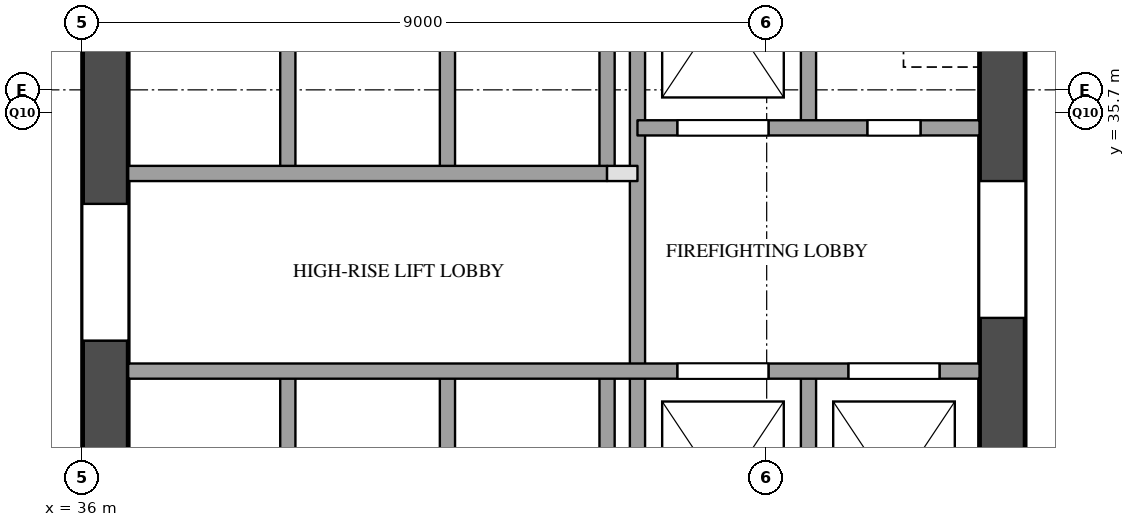
"""IFC4 building model, lengths in metres.
Left out: names, types, materials, properties, quantities, classifications, styles, units other than length and angle.
Written with IfcOpenShell. Run it as: python <this file> out.ifc"""

import sys

from ifc_helpers import new_model, si_unit, direction, frame, frame_2d, origin, place, context, subcontext, project, spatial, rectangle, extrude, element, fill, save


model = new_model("IFC4")
c1 = context("Model", 3, precision=1e-05, world=origin(), true_north=direction((0.0, 1.0)))
c2 = subcontext(c1, "Body", "Model", "MODEL_VIEW")
j1 = project(units=[si_unit("LENGTHUNIT", "METRE"), si_unit("PLANEANGLEUNIT", "RADIAN")], contexts=[c1])
p1 = place(None, origin())
s1 = spatial("IfcSite", under=j1, at=p1, CompositionType="ELEMENT")
p2 = place(p1, origin())
s2 = spatial("IfcBuilding", under=s1, at=p2, CompositionType="ELEMENT")
p3 = place(p2, frame((0.0, 0.0, 104.4)))
s3 = spatial("IfcBuildingStorey", under=s2, at=p3, CompositionType="ELEMENT", Elevation=104.4)
p4 = place(p3, frame((36.3, 29.1, 0.0), z_axis=(0.0, 0.0, 1.0), x_axis=(0.0, 1.0, 0.0)))
e1 = element("IfcWall", 1, at=p4, inside=s3, PredefinedType="SHEAR", context=c2, shape_type="SweptSolid", body=[
    extrude(rectangle(XDim=20.3, YDim=0.6, at=frame_2d((10.15, 0.0))), origin(), (0.0, 0.0, 1.0), 3.5),
])
p5 = place(p4, frame((3.6, 0.0, 0.0)))
e2 = element("IfcOpeningElement", 2, at=p5, cuts=e1, PredefinedType="OPENING", context=c2, shape_type="SweptSolid", body=[
    extrude(rectangle(XDim=1.8, YDim=2.1, at=frame_2d((0.9, 1.05))), frame((0.0, 0.31, 0.0), z_axis=(0.0, -1.0, 0.0), x_axis=(1.0, 0.0, 0.0)), (0.0, 0.0, 1.0), 0.62),
])
p6 = place(p4, frame((16.4, 0.0, 0.0)))
e3 = element("IfcOpeningElement", 3, at=p6, cuts=e1, PredefinedType="OPENING", context=c2, shape_type="SweptSolid", body=[
    extrude(rectangle(XDim=1.0, YDim=2.1, at=frame_2d((0.5, 1.05))), frame((0.0, 0.31, 0.0), z_axis=(0.0, -1.0, 0.0), x_axis=(1.0, 0.0, 0.0)), (0.0, 0.0, 1.0), 0.62),
])
p7 = place(p3, frame((48.1, 29.1, 0.0), z_axis=(0.0, 0.0, 1.0), x_axis=(0.0, 1.0, 0.0)))
e4 = element("IfcWall", 4, at=p7, inside=s3, PredefinedType="SHEAR", context=c2, shape_type="SweptSolid", body=[
    extrude(rectangle(XDim=20.3, YDim=0.6, at=frame_2d((10.15, 0.0))), origin(), (0.0, 0.0, 1.0), 3.5),
])
p8 = place(p7, frame((12.5, 0.0, 0.0)))
e5 = element("IfcOpeningElement", 5, at=p8, cuts=e4, PredefinedType="OPENING", context=c2, shape_type="SweptSolid", body=[
    extrude(rectangle(XDim=0.7, YDim=2.1, at=frame_2d((0.35, 1.05))), frame((0.0, 0.31, 0.0), z_axis=(0.0, -1.0, 0.0), x_axis=(1.0, 0.0, 0.0)), (0.0, 0.0, 1.0), 0.62),
])
p9 = place(p7, frame((3.9, 0.0, 0.0)))
e6 = element("IfcOpeningElement", 6, at=p9, cuts=e4, PredefinedType="OPENING", context=c2, shape_type="SweptSolid", body=[
    extrude(rectangle(XDim=1.8, YDim=2.1, at=frame_2d((0.9, 1.05))), frame((0.0, 0.31, 0.0), z_axis=(0.0, -1.0, 0.0), x_axis=(1.0, 0.0, 0.0)), (0.0, 0.0, 1.0), 0.62),
])
p10 = place(p3, frame((38.7, 29.1, 0.0), z_axis=(0.0, 0.0, 1.0), x_axis=(0.0, 1.0, 0.0)))
e7 = element("IfcWall", 7, at=p10, inside=s3, PredefinedType="SOLIDWALL", context=c2, shape_type="SweptSolid", body=[
    extrude(rectangle(XDim=3.2, YDim=0.2, at=frame_2d((1.6, 0.0))), origin(), (0.0, 0.0, 1.0), 3.5),
])
p11 = place(p3, frame((38.7, 34.9, 0.0), z_axis=(0.0, 0.0, 1.0), x_axis=(0.0, 1.0, 0.0)))
e8 = element("IfcWall", 8, at=p11, inside=s3, PredefinedType="SOLIDWALL", context=c2, shape_type="SweptSolid", body=[
    extrude(rectangle(XDim=3.2, YDim=0.2, at=frame_2d((1.6, 0.0))), origin(), (0.0, 0.0, 1.0), 3.5),
])
p12 = place(p3, frame((40.8, 29.1, 0.0), z_axis=(0.0, 0.0, 1.0), x_axis=(0.0, 1.0, 0.0)))
e9 = element("IfcWall", 9, at=p12, inside=s3, PredefinedType="SOLIDWALL", context=c2, shape_type="SweptSolid", body=[
    extrude(rectangle(XDim=3.2, YDim=0.2, at=frame_2d((1.6, 0.0))), origin(), (0.0, 0.0, 1.0), 3.5),
])
p13 = place(p3, frame((40.8, 34.9, 0.0), z_axis=(0.0, 0.0, 1.0), x_axis=(0.0, 1.0, 0.0)))
e10 = element("IfcWall", 10, at=p13, inside=s3, PredefinedType="SOLIDWALL", context=c2, shape_type="SweptSolid", body=[
    extrude(rectangle(XDim=3.2, YDim=0.2, at=frame_2d((1.6, 0.0))), origin(), (0.0, 0.0, 1.0), 3.5),
])
p14 = place(p3, frame((42.9, 29.1, 0.0), z_axis=(0.0, 0.0, 1.0), x_axis=(0.0, 1.0, 0.0)))
e11 = element("IfcWall", 11, at=p14, inside=s3, PredefinedType="SOLIDWALL", context=c2, shape_type="SweptSolid", body=[
    extrude(rectangle(XDim=3.2, YDim=0.2, at=frame_2d((1.6, 0.0))), origin(), (0.0, 0.0, 1.0), 3.5),
])
p15 = place(p3, frame((42.9, 34.9, 0.0), z_axis=(0.0, 0.0, 1.0), x_axis=(0.0, 1.0, 0.0)))
e12 = element("IfcWall", 12, at=p15, inside=s3, PredefinedType="SOLIDWALL", context=c2, shape_type="SweptSolid", body=[
    extrude(rectangle(XDim=3.2, YDim=0.2, at=frame_2d((1.6, 0.0))), origin(), (0.0, 0.0, 1.0), 3.5),
])
p16 = place(p3, frame((43.3, 29.1, 0.0), z_axis=(0.0, 0.0, 1.0), x_axis=(0.0, 1.0, 0.0)))
e13 = element("IfcWall", 13, at=p16, inside=s3, PredefinedType="SOLIDWALL", context=c2, shape_type="SweptSolid", body=[
    extrude(rectangle(XDim=9.9, YDim=0.2, at=frame_2d((4.95, 0.0))), origin(), (0.0, 0.0, 1.0), 3.5),
])
for number, where, z_axis, x_axis in (
    (14, (45.55, 29.1, 0.0), (0.0, 0.0, 1.0), (0.0, 1.0, 0.0)),
    (15, (45.55, 35.5, 0.0), (0.0, 0.0, 1.0), (0.0, 1.0, 0.0)),
):
    element("IfcWall", number, at=place(p3, frame(where, z_axis=z_axis, x_axis=x_axis)), inside=s3, PredefinedType="SOLIDWALL", context=c2, shape_type="SweptSolid", body=[
        extrude(rectangle(XDim=3.2, YDim=0.2, at=frame_2d((1.6, 0.0))), origin(), (0.0, 0.0, 1.0), 3.5),
    ])
p17 = place(p3, frame((36.6, 32.3, 0.0), z_axis=(0.0, 0.0, 1.0), x_axis=(1.0, 0.0, 0.0)))
e16 = element("IfcWall", 16, at=p17, inside=s3, PredefinedType="SOLIDWALL", context=c2, shape_type="SweptSolid", body=[
    extrude(rectangle(XDim=11.2, YDim=0.2, at=frame_2d((5.6, 0.0))), origin(), (0.0, 0.0, 1.0), 3.5),
])
p18 = place(p17, frame((7.225, 0.0, 0.0)))
e17 = element("IfcOpeningElement", 17, at=p18, cuts=e16, PredefinedType="OPENING", context=c2, shape_type="SweptSolid", body=[
    extrude(rectangle(XDim=1.2, YDim=2.1, at=frame_2d((0.6, 1.05))), frame((0.0, 0.11, 0.0), z_axis=(0.0, -1.0, 0.0), x_axis=(1.0, 0.0, 0.0)), (0.0, 0.0, 1.0), 0.22),
])
p19 = place(p17, frame((9.475, 0.0, 0.0)))
e18 = element("IfcOpeningElement", 18, at=p19, cuts=e16, PredefinedType="OPENING", context=c2, shape_type="SweptSolid", body=[
    extrude(rectangle(XDim=1.2, YDim=2.1, at=frame_2d((0.6, 1.05))), frame((0.0, 0.11, 0.0), z_axis=(0.0, -1.0, 0.0), x_axis=(1.0, 0.0, 0.0)), (0.0, 0.0, 1.0), 0.22),
])
p20 = place(p3, frame((42.9, 34.9, 0.0), z_axis=(0.0, 0.0, 1.0), x_axis=(1.0, 0.0, 0.0)))
e19 = element("IfcWall", 19, at=p20, inside=s3, PredefinedType="PARTITIONING", context=c2, shape_type="SweptSolid", body=[
    extrude(rectangle(XDim=0.4, YDim=0.2, at=frame_2d((0.2, 0.0))), origin(), (0.0, 0.0, 1.0), 3.5),
])
p21 = place(p3, frame((36.6, 34.9, 0.0), z_axis=(0.0, 0.0, 1.0), x_axis=(1.0, 0.0, 0.0)))
e20 = element("IfcWall", 20, at=p21, inside=s3, PredefinedType="SOLIDWALL", context=c2, shape_type="SweptSolid", body=[
    extrude(rectangle(XDim=6.3, YDim=0.2, at=frame_2d((3.15, 0.0))), origin(), (0.0, 0.0, 1.0), 3.5),
])
p22 = place(p3, frame((43.3, 35.5, 0.0), z_axis=(0.0, 0.0, 1.0), x_axis=(1.0, 0.0, 0.0)))
e21 = element("IfcWall", 21, at=p22, inside=s3, PredefinedType="SOLIDWALL", context=c2, shape_type="SweptSolid", body=[
    extrude(rectangle(XDim=4.5, YDim=0.2, at=frame_2d((2.25, 0.0))), origin(), (0.0, 0.0, 1.0), 3.5),
])
p23 = place(p22, frame((0.525, 0.0, 0.0)))
e22 = element("IfcOpeningElement", 22, at=p23, cuts=e21, PredefinedType="OPENING", context=c2, shape_type="SweptSolid", body=[
    extrude(rectangle(XDim=1.2, YDim=2.1, at=frame_2d((0.6, 1.05))), frame((0.0, 0.11, 0.0), z_axis=(0.0, -1.0, 0.0), x_axis=(1.0, 0.0, 0.0)), (0.0, 0.0, 1.0), 0.22),
])
p24 = place(p22, frame((3.025, 0.0, 0.0)))
e23 = element("IfcOpeningElement", 23, at=p24, cuts=e21, PredefinedType="OPENING", context=c2, shape_type="SweptSolid", body=[
    extrude(rectangle(XDim=0.7, YDim=2.1, at=frame_2d((0.35, 1.05))), frame((0.0, 0.11, 0.0), z_axis=(0.0, -1.0, 0.0), x_axis=(1.0, 0.0, 0.0)), (0.0, 0.0, 1.0), 0.22),
])
p25 = place(p18, origin())
e24 = element("IfcDoor", 24, at=p25, inside=s3, OperationType="SLIDING_TO_LEFT", PredefinedType="DOOR", context=c2, shape_type="SweptSolid", body=[
    extrude(rectangle(XDim=1.2, YDim=2.1, at=frame_2d((0.6, 1.05))), frame((0.0, 0.025, 0.0), z_axis=(0.0, -1.0, 0.0), x_axis=(1.0, 0.0, 0.0)), (0.0, 0.0, 1.0), 0.05),
])
fill(e17, e24)
p26 = place(p19, origin())
e25 = element("IfcDoor", 25, at=p26, inside=s3, OperationType="SLIDING_TO_LEFT", PredefinedType="DOOR", context=c2, shape_type="SweptSolid", body=[
    extrude(rectangle(XDim=1.2, YDim=2.1, at=frame_2d((0.6, 1.05))), frame((0.0, 0.025, 0.0), z_axis=(0.0, -1.0, 0.0), x_axis=(1.0, 0.0, 0.0)), (0.0, 0.0, 1.0), 0.05),
])
fill(e18, e25)
p27 = place(p23, origin())
e26 = element("IfcDoor", 26, at=p27, inside=s3, OperationType="SLIDING_TO_LEFT", PredefinedType="DOOR", context=c2, shape_type="SweptSolid", body=[
    extrude(rectangle(XDim=1.2, YDim=2.1, at=frame_2d((0.6, 1.05))), frame((0.0, 0.025, 0.0), z_axis=(0.0, -1.0, 0.0), x_axis=(1.0, 0.0, 0.0)), (0.0, 0.0, 1.0), 0.05),
])
fill(e22, e26)
p28 = place(p5, origin())
e27 = element("IfcDoor", 27, at=p28, inside=s3, OperationType="DOUBLE_DOOR_SINGLE_SWING", PredefinedType="DOOR", context=c2, shape_type="SweptSolid", body=[
    extrude(rectangle(XDim=1.8, YDim=2.1, at=frame_2d((0.9, 1.05))), frame((0.0, 0.025, 0.0), z_axis=(0.0, -1.0, 0.0), x_axis=(1.0, 0.0, 0.0)), (0.0, 0.0, 1.0), 0.05),
])
fill(e2, e27)
p29 = place(p9, origin())
e28 = element("IfcDoor", 28, at=p29, inside=s3, OperationType="DOUBLE_DOOR_SINGLE_SWING", PredefinedType="DOOR", context=c2, shape_type="SweptSolid", body=[
    extrude(rectangle(XDim=1.8, YDim=2.1, at=frame_2d((0.9, 1.05))), frame((0.0, 0.025, 0.0), z_axis=(0.0, -1.0, 0.0), x_axis=(1.0, 0.0, 0.0)), (0.0, 0.0, 1.0), 0.05),
])
fill(e6, e28)
p30 = place(p24, origin())
e29 = element("IfcDoor", 29, at=p30, inside=s3, OperationType="SINGLE_SWING_RIGHT", PredefinedType="DOOR", context=c2, shape_type="SweptSolid", body=[
    extrude(rectangle(XDim=0.7, YDim=2.1, at=frame_2d((0.35, 1.05))), frame((0.0, 0.025, 0.0), z_axis=(0.0, -1.0, 0.0), x_axis=(1.0, 0.0, 0.0)), (0.0, 0.0, 1.0), 0.05),
])
fill(e23, e29)
save(model, sys.argv[1])
